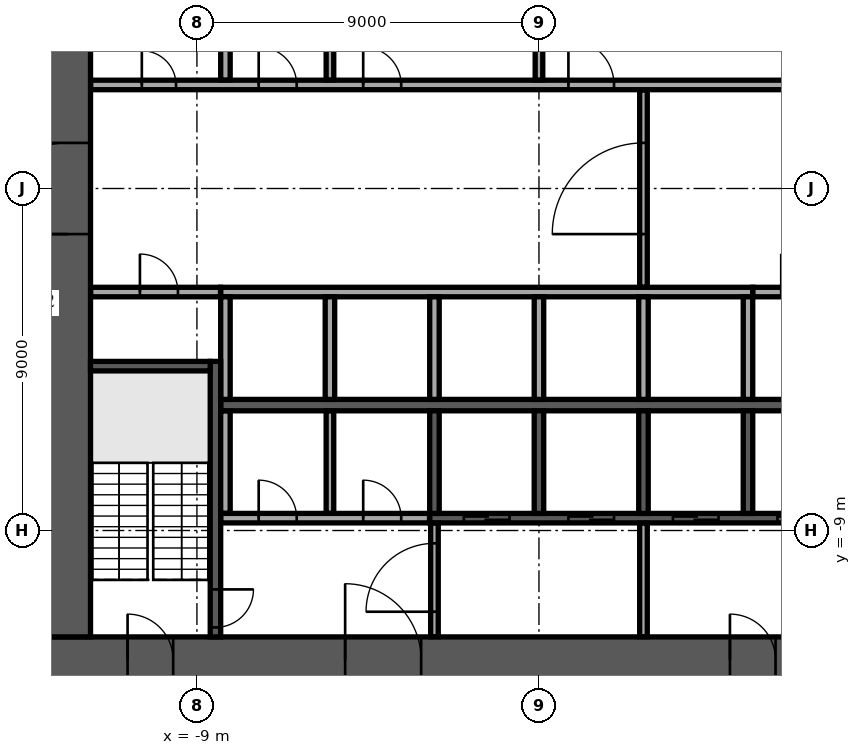
"""IFC4 building model, lengths in metres.
Left out: names, types, materials, properties, quantities, classifications, styles, units other than length and angle.
Written with IfcOpenShell. Run it as: python <this file> out.ifc"""

import sys

from ifc_helpers import new_model, si_unit, direction, frame, frame_2d, origin, place, context, subcontext, project, spatial, rectangle, extrude, element, fill, save


model = new_model("IFC4")
c1 = context("Model", 3, precision=1e-05, world=origin(), true_north=direction((0.0, 1.0)))
c2 = subcontext(c1, "Body", "Model", "MODEL_VIEW")
j1 = project(units=[si_unit("LENGTHUNIT", "METRE"), si_unit("PLANEANGLEUNIT", "RADIAN")], contexts=[c1])
p1 = place(None, origin())
s1 = spatial("IfcSite", under=j1, at=p1, CompositionType="ELEMENT")
p2 = place(p1, origin())
s2 = spatial("IfcBuilding", under=s1, at=p2, CompositionType="ELEMENT")
p3 = place(p2, frame((0.0, 0.0, 68.1)))
s3 = spatial("IfcBuildingStorey", under=s2, at=p3, CompositionType="ELEMENT", Elevation=68.1)
p4 = place(p3, frame((-13.0, -12.4, 0.0), z_axis=(0.0, 0.0, 1.0), x_axis=(1.0, 0.0, 0.0)))
e1 = element("IfcWall", 1, at=p4, inside=s3, PredefinedType="SHEAR", context=c2, shape_type="SweptSolid", body=[
    extrude(rectangle(XDim=26.0, YDim=1.2, at=frame_2d((13.0, 0.0))), origin(), (0.0, 0.0, 1.0), 3.75),
])
p5 = place(p4, frame((7.9, 0.0, 0.0)))
e2 = element("IfcOpeningElement", 2, at=p5, cuts=e1, PredefinedType="OPENING", context=c2, shape_type="SweptSolid", body=[
    extrude(rectangle(XDim=2.0, YDim=2.1, at=frame_2d((1.0, 1.05))), frame((0.0, 0.61, 0.0), z_axis=(0.0, -1.0, 0.0), x_axis=(1.0, 0.0, 0.0)), (0.0, 0.0, 1.0), 1.22),
])
p6 = place(p4, frame((18.025, 0.0, 0.0)))
e3 = element("IfcOpeningElement", 3, at=p6, cuts=e1, PredefinedType="OPENING", context=c2, shape_type="SweptSolid", body=[
    extrude(rectangle(XDim=1.2, YDim=2.1, at=frame_2d((0.6, 1.05))), frame((0.0, 0.61, 0.0), z_axis=(0.0, -1.0, 0.0), x_axis=(1.0, 0.0, 0.0)), (0.0, 0.0, 1.0), 1.22),
])
p7 = place(p4, frame((2.175, 0.0, 0.0)))
e4 = element("IfcOpeningElement", 4, at=p7, cuts=e1, PredefinedType="OPENING", context=c2, shape_type="SweptSolid", body=[
    extrude(rectangle(XDim=1.2, YDim=2.1, at=frame_2d((0.6, 1.05))), frame((0.0, 0.61, 0.0), z_axis=(0.0, -1.0, 0.0), x_axis=(1.0, 0.0, 0.0)), (0.0, 0.0, 1.0), 1.22),
])
p8 = place(p4, frame((22.625, 0.0, 0.0)))
e5 = element("IfcOpeningElement", 5, at=p8, cuts=e1, PredefinedType="OPENING", context=c2, shape_type="SweptSolid", body=[
    extrude(rectangle(XDim=1.2, YDim=2.1, at=frame_2d((0.6, 1.05))), frame((0.0, 0.61, 0.0), z_axis=(0.0, -1.0, 0.0), x_axis=(1.0, 0.0, 0.0)), (0.0, 0.0, 1.0), 1.22),
])
p9 = place(p3, frame((-12.4, -11.8, 0.0), z_axis=(0.0, 0.0, 1.0), x_axis=(0.0, 1.0, 0.0)))
e6 = element("IfcWall", 6, at=p9, inside=s3, PredefinedType="SHEAR", context=c2, shape_type="SweptSolid", body=[
    extrude(rectangle(XDim=23.6, YDim=1.2, at=frame_2d((11.8, 0.0))), origin(), (0.0, 0.0, 1.0), 3.75),
])
p10 = place(p9, frame((10.6, 0.0, 0.0)))
e7 = element("IfcOpeningElement", 7, at=p10, cuts=e6, PredefinedType="OPENING", context=c2, shape_type="SweptSolid", body=[
    extrude(rectangle(XDim=2.4, YDim=2.4, at=frame_2d((1.2, 1.2))), frame((0.0, 0.61, 0.0), z_axis=(0.0, -1.0, 0.0), x_axis=(1.0, 0.0, 0.0)), (0.0, 0.0, 1.0), 1.22),
])
p11 = place(p3, frame((-8.375, -5.7, 0.0), z_axis=(0.0, 0.0, 1.0), x_axis=(1.0, 0.0, 0.0)))
e8 = element("IfcWall", 8, at=p11, inside=s3, PredefinedType="SOLIDWALL", context=c2, shape_type="SweptSolid", body=[
    extrude(rectangle(XDim=16.75, YDim=0.3, at=frame_2d((8.375, 0.0))), origin(), (0.0, 0.0, 1.0), 3.75),
])
p12 = place(p3, frame((-8.375, -2.725, 0.0), z_axis=(0.0, 0.0, 1.0), x_axis=(1.0, 0.0, 0.0)))
e9 = element("IfcWall", 9, at=p12, inside=s3, PredefinedType="SOLIDWALL", context=c2, shape_type="SweptSolid", body=[
    extrude(rectangle(XDim=14.0, YDim=0.25, at=frame_2d((7.0, 0.0))), origin(), (0.0, 0.0, 1.0), 3.75),
])
for number, where, z_axis, x_axis in (
    (10, (-8.25, -5.55, 0.0), (0.0, 0.0, 1.0), (0.0, 1.0, 0.0)),
    (11, (-5.5, -5.55, 0.0), (0.0, 0.0, 1.0), (0.0, 1.0, 0.0)),
    (12, (-2.75, -5.55, 0.0), (0.0, 0.0, 1.0), (0.0, 1.0, 0.0)),
    (13, (0.0, -5.55, 0.0), (0.0, 0.0, 1.0), (0.0, 1.0, 0.0)),
    (14, (2.75, -5.55, 0.0), (0.0, 0.0, 1.0), (0.0, 1.0, 0.0)),
    (15, (5.5, -5.55, 0.0), (0.0, 0.0, 1.0), (0.0, 1.0, 0.0)),
):
    element("IfcWall", number, at=place(p3, frame(where, z_axis=z_axis, x_axis=x_axis)), inside=s3, PredefinedType="SOLIDWALL", context=c2, shape_type="SweptSolid", body=[
        extrude(rectangle(XDim=2.7, YDim=0.25, at=frame_2d((1.35, 0.0))), origin(), (0.0, 0.0, 1.0), 3.75),
    ])
p13 = place(p3, frame((-2.875, -8.675, 0.0), z_axis=(0.0, 0.0, 1.0), x_axis=(1.0, 0.0, 0.0)))
e16 = element("IfcWall", 16, at=p13, inside=s3, PredefinedType="SOLIDWALL", context=c2, shape_type="SweptSolid", body=[
    extrude(rectangle(XDim=11.25, YDim=0.25, at=frame_2d((5.625, 0.0))), origin(), (0.0, 0.0, 1.0), 3.75),
])
p14 = place(p13, frame((0.9, 0.0, 0.0)))
e17 = element("IfcOpeningElement", 17, at=p14, cuts=e16, PredefinedType="OPENING", context=c2, shape_type="SweptSolid", body=[
    extrude(rectangle(XDim=1.2, YDim=2.1, at=frame_2d((0.6, 1.05))), frame((0.0, 0.135, 0.0), z_axis=(0.0, -1.0, 0.0), x_axis=(1.0, 0.0, 0.0)), (0.0, 0.0, 1.0), 0.27),
])
p15 = place(p13, frame((3.65, 0.0, 0.0)))
e18 = element("IfcOpeningElement", 18, at=p15, cuts=e16, PredefinedType="OPENING", context=c2, shape_type="SweptSolid", body=[
    extrude(rectangle(XDim=1.2, YDim=2.1, at=frame_2d((0.6, 1.05))), frame((0.0, 0.135, 0.0), z_axis=(0.0, -1.0, 0.0), x_axis=(1.0, 0.0, 0.0)), (0.0, 0.0, 1.0), 0.27),
])
p16 = place(p13, frame((6.4, 0.0, 0.0)))
e19 = element("IfcOpeningElement", 19, at=p16, cuts=e16, PredefinedType="OPENING", context=c2, shape_type="SweptSolid", body=[
    extrude(rectangle(XDim=1.2, YDim=2.1, at=frame_2d((0.6, 1.05))), frame((0.0, 0.135, 0.0), z_axis=(0.0, -1.0, 0.0), x_axis=(1.0, 0.0, 0.0)), (0.0, 0.0, 1.0), 0.27),
])
p17 = place(p13, frame((9.15, 0.0, 0.0)))
e20 = element("IfcOpeningElement", 20, at=p17, cuts=e16, PredefinedType="OPENING", context=c2, shape_type="SweptSolid", body=[
    extrude(rectangle(XDim=1.2, YDim=2.1, at=frame_2d((0.6, 1.05))), frame((0.0, 0.135, 0.0), z_axis=(0.0, -1.0, 0.0), x_axis=(1.0, 0.0, 0.0)), (0.0, 0.0, 1.0), 0.27),
])
for number, where, z_axis, x_axis in (
    (21, (-2.75, -8.55, 0.0), (0.0, 0.0, 1.0), (0.0, 1.0, 0.0)),
    (22, (0.0, -8.55, 0.0), (0.0, 0.0, 1.0), (0.0, 1.0, 0.0)),
    (23, (2.75, -8.55, 0.0), (0.0, 0.0, 1.0), (0.0, 1.0, 0.0)),
    (24, (5.5, -8.55, 0.0), (0.0, 0.0, 1.0), (0.0, 1.0, 0.0)),
):
    element("IfcWall", number, at=place(p3, frame(where, z_axis=z_axis, x_axis=x_axis)), inside=s3, PredefinedType="SOLIDWALL", context=c2, shape_type="SweptSolid", body=[
        extrude(rectangle(XDim=2.7, YDim=0.25, at=frame_2d((1.35, 0.0))), origin(), (0.0, 0.0, 1.0), 3.75),
    ])
p18 = place(p3, frame((-8.512, -4.55, 0.0), z_axis=(0.0, 0.0, 1.0), x_axis=(0.0, -1.0, 0.0)))
e25 = element("IfcWall", 25, at=p18, inside=s3, PredefinedType="SOLIDWALL", context=c2, shape_type="SweptSolid", body=[
    extrude(rectangle(XDim=7.25, YDim=0.275, at=frame_2d((3.625, 0.0))), origin(), (0.0, 0.0, 1.0), 3.75),
])
p19 = place(p18, frame((6.0, 0.0, 0.0)))
e26 = element("IfcOpeningElement", 26, at=p19, cuts=e25, PredefinedType="OPENING", context=c2, shape_type="SweptSolid", body=[
    extrude(rectangle(XDim=1.0, YDim=2.1, at=frame_2d((0.5, 1.05))), frame((0.0, 0.147, 0.0), z_axis=(0.0, -1.0, 0.0), x_axis=(1.0, 0.0, 0.0)), (0.0, 0.0, 1.0), 0.295),
])
p20 = place(p3, frame((-8.65, -4.675, 0.0), z_axis=(0.0, 0.0, 1.0), x_axis=(-1.0, 0.0, 0.0)))
e27 = element("IfcWall", 27, at=p20, inside=s3, PredefinedType="SOLIDWALL", context=c2, shape_type="SweptSolid", body=[
    extrude(rectangle(XDim=3.15, YDim=0.25, at=frame_2d((1.575, 0.0))), origin(), (0.0, 0.0, 1.0), 3.75),
])
p21 = place(p3, frame((-2.75, -11.795, 0.0), z_axis=(0.0, 0.0, 1.0), x_axis=(0.0, 1.0, 0.0)))
e28 = element("IfcWall", 28, at=p21, inside=s3, PredefinedType="PARTITIONING", context=c2, shape_type="SweptSolid", body=[
    extrude(rectangle(XDim=2.99, YDim=0.2, at=frame_2d((1.495, 0.0))), origin(), (0.0, 0.0, 1.0), 3.75),
])
p22 = place(p21, frame((0.657, 0.0, 0.0)))
e29 = element("IfcOpeningElement", 29, at=p22, cuts=e28, PredefinedType="OPENING", context=c2, shape_type="SweptSolid", body=[
    extrude(rectangle(XDim=1.8, YDim=2.1, at=frame_2d((0.9, 1.05))), frame((0.0, 0.11, 0.0), z_axis=(0.0, -1.0, 0.0), x_axis=(1.0, 0.0, 0.0)), (0.0, 0.0, 1.0), 0.22),
])
p23 = place(p3, frame((2.75, -11.795, 0.0), z_axis=(0.0, 0.0, 1.0), x_axis=(0.0, 1.0, 0.0)))
e30 = element("IfcWall", 30, at=p23, inside=s3, PredefinedType="PARTITIONING", context=c2, shape_type="SweptSolid", body=[
    extrude(rectangle(XDim=2.99, YDim=0.2, at=frame_2d((1.495, 0.0))), origin(), (0.0, 0.0, 1.0), 3.75),
])
p24 = place(p3, frame((-8.37, -8.675, 0.0), z_axis=(0.0, 0.0, 1.0), x_axis=(1.0, 0.0, 0.0)))
e31 = element("IfcWall", 31, at=p24, inside=s3, PredefinedType="PARTITIONING", context=c2, shape_type="SweptSolid", body=[
    extrude(rectangle(XDim=5.49, YDim=0.25, at=frame_2d((2.745, 0.0))), origin(), (0.0, 0.0, 1.0), 3.75),
])
p25 = place(p24, frame((0.995, 0.0, 0.0)))
e32 = element("IfcOpeningElement", 32, at=p25, cuts=e31, PredefinedType="OPENING", context=c2, shape_type="SweptSolid", body=[
    extrude(rectangle(XDim=1.0, YDim=2.1, at=frame_2d((0.5, 1.05))), frame((0.0, 0.135, 0.0), z_axis=(0.0, -1.0, 0.0), x_axis=(1.0, 0.0, 0.0)), (0.0, 0.0, 1.0), 0.27),
])
p26 = place(p24, frame((3.745, 0.0, 0.0)))
e33 = element("IfcOpeningElement", 33, at=p26, cuts=e31, PredefinedType="OPENING", context=c2, shape_type="SweptSolid", body=[
    extrude(rectangle(XDim=1.0, YDim=2.1, at=frame_2d((0.5, 1.05))), frame((0.0, 0.135, 0.0), z_axis=(0.0, -1.0, 0.0), x_axis=(1.0, 0.0, 0.0)), (0.0, 0.0, 1.0), 0.27),
])
p27 = place(p3, frame((-8.25, -8.545, 0.0), z_axis=(0.0, 0.0, 1.0), x_axis=(0.0, 1.0, 0.0)))
e34 = element("IfcWall", 34, at=p27, inside=s3, PredefinedType="PARTITIONING", context=c2, shape_type="SweptSolid", body=[
    extrude(rectangle(XDim=2.69, YDim=0.25, at=frame_2d((1.345, 0.0))), origin(), (0.0, 0.0, 1.0), 3.75),
])
p28 = place(p3, frame((-5.5, -8.545, 0.0), z_axis=(0.0, 0.0, 1.0), x_axis=(0.0, 1.0, 0.0)))
e35 = element("IfcWall", 35, at=p28, inside=s3, PredefinedType="PARTITIONING", context=c2, shape_type="SweptSolid", body=[
    extrude(rectangle(XDim=2.69, YDim=0.2, at=frame_2d((1.345, 0.0))), origin(), (0.0, 0.0, 1.0), 3.75),
])
p29 = place(p3, frame((-11.795, -2.725, 0.0), z_axis=(0.0, 0.0, 1.0), x_axis=(1.0, 0.0, 0.0)))
e36 = element("IfcWall", 36, at=p29, inside=s3, PredefinedType="PARTITIONING", context=c2, shape_type="SweptSolid", body=[
    extrude(rectangle(XDim=3.415, YDim=0.25, at=frame_2d((1.708, 0.0))), origin(), (0.0, 0.0, 1.0), 3.75),
])
p30 = place(p29, frame((1.295, 0.0, 0.0)))
e37 = element("IfcOpeningElement", 37, at=p30, cuts=e36, PredefinedType="OPENING", context=c2, shape_type="SweptSolid", body=[
    extrude(rectangle(XDim=1.0, YDim=2.1, at=frame_2d((0.5, 1.05))), frame((0.0, 0.135, 0.0), z_axis=(0.0, -1.0, 0.0), x_axis=(1.0, 0.0, 0.0)), (0.0, 0.0, 1.0), 0.27),
])
p31 = place(p3, frame((5.63, -2.725, 0.0), z_axis=(0.0, 0.0, 1.0), x_axis=(1.0, 0.0, 0.0)))
e38 = element("IfcWall", 38, at=p31, inside=s3, PredefinedType="PARTITIONING", context=c2, shape_type="SweptSolid", body=[
    extrude(rectangle(XDim=6.165, YDim=0.25, at=frame_2d((3.083, 0.0))), origin(), (0.0, 0.0, 1.0), 3.75),
])
p32 = place(p31, frame((0.745, 0.0, 0.0)))
e39 = element("IfcOpeningElement", 39, at=p32, cuts=e38, PredefinedType="OPENING", context=c2, shape_type="SweptSolid", body=[
    extrude(rectangle(XDim=1.0, YDim=2.1, at=frame_2d((0.5, 1.05))), frame((0.0, 0.135, 0.0), z_axis=(0.0, -1.0, 0.0), x_axis=(1.0, 0.0, 0.0)), (0.0, 0.0, 1.0), 0.27),
])
p33 = place(p31, frame((3.92, 0.0, 0.0)))
e40 = element("IfcOpeningElement", 40, at=p33, cuts=e38, PredefinedType="OPENING", context=c2, shape_type="SweptSolid", body=[
    extrude(rectangle(XDim=0.9, YDim=2.1, at=frame_2d((0.45, 1.05))), frame((0.0, 0.135, 0.0), z_axis=(0.0, -1.0, 0.0), x_axis=(1.0, 0.0, 0.0)), (0.0, 0.0, 1.0), 0.27),
])
p34 = place(p3, frame((2.75, -2.595, 0.0), z_axis=(0.0, 0.0, 1.0), x_axis=(0.0, 1.0, 0.0)))
e41 = element("IfcWall", 41, at=p34, inside=s3, PredefinedType="PARTITIONING", context=c2, shape_type="SweptSolid", body=[
    extrude(rectangle(XDim=5.19, YDim=0.2, at=frame_2d((2.595, 0.0))), origin(), (0.0, 0.0, 1.0), 3.75),
])
p35 = place(p34, frame((1.395, 0.0, 0.0)))
e42 = element("IfcOpeningElement", 42, at=p35, cuts=e41, PredefinedType="OPENING", context=c2, shape_type="SweptSolid", body=[
    extrude(rectangle(XDim=2.4, YDim=2.4, at=frame_2d((1.2, 1.2))), frame((0.0, 0.11, 0.0), z_axis=(0.0, -1.0, 0.0), x_axis=(1.0, 0.0, 0.0)), (0.0, 0.0, 1.0), 0.22),
])
p36 = place(p3, frame((-11.795, 2.725, 0.0), z_axis=(0.0, 0.0, 1.0), x_axis=(1.0, 0.0, 0.0)))
e43 = element("IfcWall", 43, at=p36, inside=s3, PredefinedType="PARTITIONING", context=c2, shape_type="SweptSolid", body=[
    extrude(rectangle(XDim=23.59, YDim=0.25, at=frame_2d((11.795, 0.0))), origin(), (0.0, 0.0, 1.0), 3.75),
])
p37 = place(p36, frame((21.345, 0.0, 0.0)))
e44 = element("IfcOpeningElement", 44, at=p37, cuts=e43, PredefinedType="OPENING", context=c2, shape_type="SweptSolid", body=[
    extrude(rectangle(XDim=0.9, YDim=2.1, at=frame_2d((0.45, 1.05))), frame((0.0, 0.135, 0.0), z_axis=(0.0, -1.0, 0.0), x_axis=(1.0, 0.0, 0.0)), (0.0, 0.0, 1.0), 0.27),
])
p38 = place(p36, frame((1.345, 0.0, 0.0)))
e45 = element("IfcOpeningElement", 45, at=p38, cuts=e43, PredefinedType="OPENING", context=c2, shape_type="SweptSolid", body=[
    extrude(rectangle(XDim=0.9, YDim=2.1, at=frame_2d((0.45, 1.05))), frame((0.0, 0.135, 0.0), z_axis=(0.0, -1.0, 0.0), x_axis=(1.0, 0.0, 0.0)), (0.0, 0.0, 1.0), 0.27),
])
p39 = place(p36, frame((4.42, 0.0, 0.0)))
e46 = element("IfcOpeningElement", 46, at=p39, cuts=e43, PredefinedType="OPENING", context=c2, shape_type="SweptSolid", body=[
    extrude(rectangle(XDim=1.0, YDim=2.1, at=frame_2d((0.5, 1.05))), frame((0.0, 0.135, 0.0), z_axis=(0.0, -1.0, 0.0), x_axis=(1.0, 0.0, 0.0)), (0.0, 0.0, 1.0), 0.27),
])
p40 = place(p36, frame((7.17, 0.0, 0.0)))
e47 = element("IfcOpeningElement", 47, at=p40, cuts=e43, PredefinedType="OPENING", context=c2, shape_type="SweptSolid", body=[
    extrude(rectangle(XDim=1.0, YDim=2.1, at=frame_2d((0.5, 1.05))), frame((0.0, 0.135, 0.0), z_axis=(0.0, -1.0, 0.0), x_axis=(1.0, 0.0, 0.0)), (0.0, 0.0, 1.0), 0.27),
])
p41 = place(p36, frame((12.57, 0.0, 0.0)))
e48 = element("IfcOpeningElement", 48, at=p41, cuts=e43, PredefinedType="OPENING", context=c2, shape_type="SweptSolid", body=[
    extrude(rectangle(XDim=1.2, YDim=2.1, at=frame_2d((0.6, 1.05))), frame((0.0, 0.135, 0.0), z_axis=(0.0, -1.0, 0.0), x_axis=(1.0, 0.0, 0.0)), (0.0, 0.0, 1.0), 0.27),
])
p42 = place(p3, frame((-8.25, 2.855, 0.0), z_axis=(0.0, 0.0, 1.0), x_axis=(0.0, 1.0, 0.0)))
e49 = element("IfcWall", 49, at=p42, inside=s3, PredefinedType="PARTITIONING", context=c2, shape_type="SweptSolid", body=[
    extrude(rectangle(XDim=1.715, YDim=0.25, at=frame_2d((0.857, 0.0))), origin(), (0.0, 0.0, 1.0), 3.75),
])
for number, where, z_axis, x_axis in (
    (50, (-5.5, 2.855, 0.0), (0.0, 0.0, 1.0), (0.0, 1.0, 0.0)),
    (51, (0.0, 2.855, 0.0), (0.0, 0.0, 1.0), (0.0, 1.0, 0.0)),
):
    element("IfcWall", number, at=place(p3, frame(where, z_axis=z_axis, x_axis=x_axis)), inside=s3, PredefinedType="PARTITIONING", context=c2, shape_type="SweptSolid", body=[
        extrude(rectangle(XDim=2.69, YDim=0.2, at=frame_2d((1.345, 0.0))), origin(), (0.0, 0.0, 1.0), 3.75),
    ])
p43 = place(p5, origin())
e52 = element("IfcDoor", 52, at=p43, inside=s3, OperationType="SINGLE_SWING_LEFT", PredefinedType="DOOR", context=c2, shape_type="SweptSolid", body=[
    extrude(rectangle(XDim=2.0, YDim=2.1, at=frame_2d((1.0, 1.05))), frame((0.0, 0.025, 0.0), z_axis=(0.0, -1.0, 0.0), x_axis=(1.0, 0.0, 0.0)), (0.0, 0.0, 1.0), 0.05),
])
fill(e2, e52)
p44 = place(p6, origin())
e53 = element("IfcDoor", 53, at=p44, inside=s3, OperationType="SINGLE_SWING_LEFT", PredefinedType="DOOR", context=c2, shape_type="SweptSolid", body=[
    extrude(rectangle(XDim=1.2, YDim=2.1, at=frame_2d((0.6, 1.05))), frame((0.0, 0.025, 0.0), z_axis=(0.0, -1.0, 0.0), x_axis=(1.0, 0.0, 0.0)), (0.0, 0.0, 1.0), 0.05),
])
fill(e3, e53)
p45 = place(p7, origin())
e54 = element("IfcDoor", 54, at=p45, inside=s3, OperationType="SINGLE_SWING_LEFT", PredefinedType="DOOR", context=c2, shape_type="SweptSolid", body=[
    extrude(rectangle(XDim=1.2, YDim=2.1, at=frame_2d((0.6, 1.05))), frame((0.0, 0.025, 0.0), z_axis=(0.0, -1.0, 0.0), x_axis=(1.0, 0.0, 0.0)), (0.0, 0.0, 1.0), 0.05),
])
fill(e4, e54)
p46 = place(p10, origin())
e55 = element("IfcDoor", 55, at=p46, inside=s3, OperationType="SINGLE_SWING_LEFT", PredefinedType="DOOR", context=c2, shape_type="SweptSolid", body=[
    extrude(rectangle(XDim=2.4, YDim=2.4, at=frame_2d((1.2, 1.2))), frame((0.0, 0.025, 0.0), z_axis=(0.0, -1.0, 0.0), x_axis=(1.0, 0.0, 0.0)), (0.0, 0.0, 1.0), 0.05),
])
fill(e7, e55)
p47 = place(p14, origin())
e56 = element("IfcDoor", 56, at=p47, inside=s3, OperationType="DOUBLE_DOOR_SLIDING", PredefinedType="DOOR", context=c2, shape_type="SweptSolid", body=[
    extrude(rectangle(XDim=1.2, YDim=2.1, at=frame_2d((0.6, 1.05))), frame((0.0, 0.025, 0.0), z_axis=(0.0, -1.0, 0.0), x_axis=(1.0, 0.0, 0.0)), (0.0, 0.0, 1.0), 0.05),
])
fill(e17, e56)
p48 = place(p15, origin())
e57 = element("IfcDoor", 57, at=p48, inside=s3, OperationType="DOUBLE_DOOR_SLIDING", PredefinedType="DOOR", context=c2, shape_type="SweptSolid", body=[
    extrude(rectangle(XDim=1.2, YDim=2.1, at=frame_2d((0.6, 1.05))), frame((0.0, 0.025, 0.0), z_axis=(0.0, -1.0, 0.0), x_axis=(1.0, 0.0, 0.0)), (0.0, 0.0, 1.0), 0.05),
])
fill(e18, e57)
p49 = place(p16, origin())
e58 = element("IfcDoor", 58, at=p49, inside=s3, OperationType="DOUBLE_DOOR_SLIDING", PredefinedType="DOOR", context=c2, shape_type="SweptSolid", body=[
    extrude(rectangle(XDim=1.2, YDim=2.1, at=frame_2d((0.6, 1.05))), frame((0.0, 0.025, 0.0), z_axis=(0.0, -1.0, 0.0), x_axis=(1.0, 0.0, 0.0)), (0.0, 0.0, 1.0), 0.05),
])
fill(e19, e58)
p50 = place(p17, origin())
e59 = element("IfcDoor", 59, at=p50, inside=s3, OperationType="DOUBLE_DOOR_SLIDING", PredefinedType="DOOR", context=c2, shape_type="SweptSolid", body=[
    extrude(rectangle(XDim=1.2, YDim=2.1, at=frame_2d((0.6, 1.05))), frame((0.0, 0.025, 0.0), z_axis=(0.0, -1.0, 0.0), x_axis=(1.0, 0.0, 0.0)), (0.0, 0.0, 1.0), 0.05),
])
fill(e20, e59)
p51 = place(p19, origin())
e60 = element("IfcDoor", 60, at=p51, inside=s3, OperationType="SINGLE_SWING_LEFT", PredefinedType="DOOR", context=c2, shape_type="SweptSolid", body=[
    extrude(rectangle(XDim=1.0, YDim=2.1, at=frame_2d((0.5, 1.05))), frame((0.0, 0.025, 0.0), z_axis=(0.0, -1.0, 0.0), x_axis=(1.0, 0.0, 0.0)), (0.0, 0.0, 1.0), 0.05),
])
fill(e26, e60)
p52 = place(p25, origin())
e61 = element("IfcDoor", 61, at=p52, inside=s3, OperationType="SINGLE_SWING_RIGHT", PredefinedType="DOOR", context=c2, shape_type="SweptSolid", body=[
    extrude(rectangle(XDim=1.0, YDim=2.1, at=frame_2d((0.5, 1.05))), frame((0.0, 0.025, 0.0), z_axis=(0.0, -1.0, 0.0), x_axis=(1.0, 0.0, 0.0)), (0.0, 0.0, 1.0), 0.05),
])
fill(e32, e61)
p53 = place(p26, origin())
e62 = element("IfcDoor", 62, at=p53, inside=s3, OperationType="SINGLE_SWING_RIGHT", PredefinedType="DOOR", context=c2, shape_type="SweptSolid", body=[
    extrude(rectangle(XDim=1.0, YDim=2.1, at=frame_2d((0.5, 1.05))), frame((0.0, 0.025, 0.0), z_axis=(0.0, -1.0, 0.0), x_axis=(1.0, 0.0, 0.0)), (0.0, 0.0, 1.0), 0.05),
])
fill(e33, e62)
p54 = place(p30, origin())
e63 = element("IfcDoor", 63, at=p54, inside=s3, OperationType="SINGLE_SWING_RIGHT", PredefinedType="DOOR", context=c2, shape_type="SweptSolid", body=[
    extrude(rectangle(XDim=1.0, YDim=2.1, at=frame_2d((0.5, 1.05))), frame((0.0, 0.025, 0.0), z_axis=(0.0, -1.0, 0.0), x_axis=(1.0, 0.0, 0.0)), (0.0, 0.0, 1.0), 0.05),
])
fill(e37, e63)
p55 = place(p38, origin())
e64 = element("IfcDoor", 64, at=p55, inside=s3, OperationType="SINGLE_SWING_RIGHT", PredefinedType="DOOR", context=c2, shape_type="SweptSolid", body=[
    extrude(rectangle(XDim=0.9, YDim=2.1, at=frame_2d((0.45, 1.05))), frame((0.0, 0.025, 0.0), z_axis=(0.0, -1.0, 0.0), x_axis=(1.0, 0.0, 0.0)), (0.0, 0.0, 1.0), 0.05),
])
fill(e45, e64)
p56 = place(p39, origin())
e65 = element("IfcDoor", 65, at=p56, inside=s3, OperationType="SINGLE_SWING_RIGHT", PredefinedType="DOOR", context=c2, shape_type="SweptSolid", body=[
    extrude(rectangle(XDim=1.0, YDim=2.1, at=frame_2d((0.5, 1.05))), frame((0.0, 0.025, 0.0), z_axis=(0.0, -1.0, 0.0), x_axis=(1.0, 0.0, 0.0)), (0.0, 0.0, 1.0), 0.05),
])
fill(e46, e65)
p57 = place(p40, origin())
e66 = element("IfcDoor", 66, at=p57, inside=s3, OperationType="SINGLE_SWING_RIGHT", PredefinedType="DOOR", context=c2, shape_type="SweptSolid", body=[
    extrude(rectangle(XDim=1.0, YDim=2.1, at=frame_2d((0.5, 1.05))), frame((0.0, 0.025, 0.0), z_axis=(0.0, -1.0, 0.0), x_axis=(1.0, 0.0, 0.0)), (0.0, 0.0, 1.0), 0.05),
])
fill(e47, e66)
p58 = place(p41, origin())
e67 = element("IfcDoor", 67, at=p58, inside=s3, OperationType="SINGLE_SWING_LEFT", PredefinedType="DOOR", context=c2, shape_type="SweptSolid", body=[
    extrude(rectangle(XDim=1.2, YDim=2.1, at=frame_2d((0.6, 1.05))), frame((0.0, 0.025, 0.0), z_axis=(0.0, -1.0, 0.0), x_axis=(1.0, 0.0, 0.0)), (0.0, 0.0, 1.0), 0.05),
])
fill(e48, e67)
p59 = place(p35, origin())
e68 = element("IfcDoor", 68, at=p59, inside=s3, OperationType="DOUBLE_DOOR_DOUBLE_SWING", PredefinedType="DOOR", context=c2, shape_type="SweptSolid", body=[
    extrude(rectangle(XDim=2.4, YDim=2.4, at=frame_2d((1.2, 1.2))), frame((0.0, 0.025, 0.0), z_axis=(0.0, -1.0, 0.0), x_axis=(1.0, 0.0, 0.0)), (0.0, 0.0, 1.0), 0.05),
])
fill(e42, e68)
p60 = place(p22, origin())
e69 = element("IfcDoor", 69, at=p60, inside=s3, OperationType="SINGLE_SWING_LEFT", PredefinedType="DOOR", context=c2, shape_type="SweptSolid", body=[
    extrude(rectangle(XDim=1.8, YDim=2.1, at=frame_2d((0.9, 1.05))), frame((0.0, 0.025, 0.0), z_axis=(0.0, -1.0, 0.0), x_axis=(1.0, 0.0, 0.0)), (0.0, 0.0, 1.0), 0.05),
])
fill(e29, e69)
save(model, sys.argv[1])
